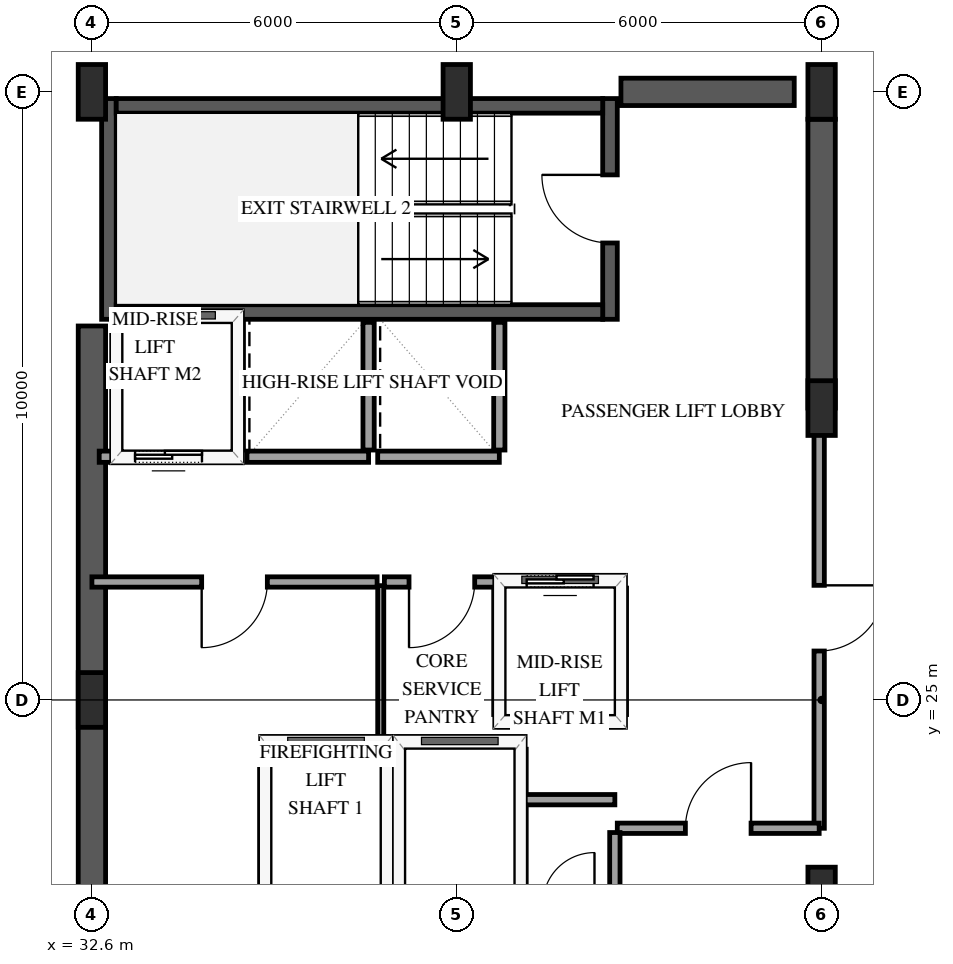
"""IFC4 building model, lengths in metres.
Left out: names, types, materials, properties, quantities, classifications, styles, units other than length and angle.
Written with IfcOpenShell. Run it as: python <this file> out.ifc"""

import sys

from ifc_helpers import new_model, si_unit, direction, frame, frame_2d, origin, origin_2d, place, context, subcontext, project, spatial, rectangle, extrude, element, fill, save


model = new_model("IFC4")
c1 = context("Model", 3, precision=1e-05, world=origin(), true_north=direction((0.0, 1.0)))
c2 = subcontext(c1, "Body", "Model", "MODEL_VIEW")
j1 = project(units=[si_unit("LENGTHUNIT", "METRE"), si_unit("PLANEANGLEUNIT", "RADIAN")], contexts=[c1])
p1 = place(None, origin())
s1 = spatial("IfcSite", under=j1, at=p1, CompositionType="ELEMENT")
p2 = place(p1, origin())
s2 = spatial("IfcBuilding", under=s1, at=p2, CompositionType="ELEMENT")
p3 = place(p2, frame((0.0, 0.0, 190.6)))
s3 = spatial("IfcBuildingStorey", under=s2, at=p3, CompositionType="ELEMENT", Elevation=190.6)
p4 = place(p3, frame((32.88, 31.26, 0.0), z_axis=(0.0, 0.0, 1.0), x_axis=(0.0, 1.0, 0.0)))
e1 = element("IfcWall", 1, at=p4, inside=s3, PredefinedType="SHEAR", context=c2, shape_type="SweptSolid", body=[
    extrude(rectangle(XDim=3.63, YDim=0.24, at=frame_2d((1.815, 0.0))), origin(), (0.0, 0.0, 1.0), 3.6),
])
p5 = place(p3, frame((41.12, 31.26, 0.0), z_axis=(0.0, 0.0, 1.0), x_axis=(0.0, 1.0, 0.0)))
e2 = element("IfcWall", 2, at=p5, inside=s3, PredefinedType="SHEAR", context=c2, shape_type="SweptSolid", body=[
    extrude(rectangle(XDim=3.63, YDim=0.24, at=frame_2d((1.815, 0.0))), origin(), (0.0, 0.0, 1.0), 3.6),
])
p6 = place(p5, frame((1.255, 0.0, 0.0)))
e3 = element("IfcOpeningElement", 3, at=p6, cuts=e2, PredefinedType="OPENING", context=c2, shape_type="SweptSolid", body=[
    extrude(rectangle(XDim=1.12, YDim=2.15, at=frame_2d((0.56, 1.075))), frame((0.0, 0.13, 0.0), z_axis=(0.0, -1.0, 0.0), x_axis=(1.0, 0.0, 0.0)), (0.0, 0.0, 1.0), 0.26),
])
for number, where, z_axis, x_axis in (
    (4, (33.0, 31.38, 0.0), (0.0, 0.0, 1.0), (1.0, 0.0, 0.0)),
    (5, (33.0, 34.77, 0.0), (0.0, 0.0, 1.0), (1.0, 0.0, 0.0)),
):
    element("IfcWall", number, at=place(p3, frame(where, z_axis=z_axis, x_axis=x_axis)), inside=s3, PredefinedType="SHEAR", context=c2, shape_type="SweptSolid", body=[
        extrude(rectangle(XDim=8.0, YDim=0.24, at=frame_2d((4.0, 0.0))), origin(), (0.0, 0.0, 1.0), 3.6),
    ])
p7 = place(p3, frame((32.6, 18.85, 0.0), z_axis=(0.0, 0.0, 1.0), x_axis=(0.0, 1.0, 0.0)))
e6 = element("IfcWall", 6, at=p7, inside=s3, PredefinedType="SHEAR", context=c2, shape_type="SweptSolid", body=[
    extrude(rectangle(XDim=12.3, YDim=0.45, at=frame_2d((6.15, 0.0))), origin(), (0.0, 0.0, 1.0), 3.6),
])
p8 = place(p3, frame((41.3, 35.0, 0.0), z_axis=(0.0, 0.0, 1.0), x_axis=(1.0, 0.0, 0.0)))
e7 = element("IfcWall", 7, at=p8, inside=s3, PredefinedType="SHEAR", context=c2, shape_type="SweptSolid", body=[
    extrude(rectangle(XDim=2.85, YDim=0.45, at=frame_2d((1.425, 0.0))), origin(), (0.0, 0.0, 1.0), 3.6),
])
p9 = place(p3, frame((44.6, 29.8, 0.0), z_axis=(0.0, 0.0, 1.0), x_axis=(0.0, 1.0, 0.0)))
e8 = element("IfcWall", 8, at=p9, inside=s3, PredefinedType="SHEAR", context=c2, shape_type="SweptSolid", body=[
    extrude(rectangle(XDim=4.75, YDim=0.45, at=frame_2d((2.375, 0.0))), origin(), (0.0, 0.0, 1.0), 3.6),
])
for number, where, z_axis, x_axis in (
    (9, (32.6, 25.0, -0.3), (0.0, 0.0, 1.0), (1.0, 0.0, 0.0)),
    (10, (32.6, 35.0, -0.3), (0.0, 0.0, 1.0), (1.0, 0.0, 0.0)),
    (11, (38.6, 35.0, -0.3), (0.0, 0.0, 1.0), (1.0, 0.0, 0.0)),
    (12, (44.6, 21.8, -0.3), (0.0, 0.0, 1.0), (1.0, 0.0, 0.0)),
    (13, (44.6, 29.8, -0.3), (0.0, 0.0, 1.0), (1.0, 0.0, 0.0)),
    (14, (44.6, 35.0, -0.3), (0.0, 0.0, 1.0), (1.0, 0.0, 0.0)),
):
    element("IfcColumn", number, at=place(p3, frame(where, z_axis=z_axis, x_axis=x_axis)), inside=s3, PredefinedType="PILASTER", context=c2, shape_type="SweptSolid", body=[
        extrude(rectangle(XDim=0.45, YDim=0.9, at=origin_2d()), origin(), (0.0, 0.0, 1.0), 3.9),
    ])
p10 = place(p3, frame((35.45, 24.3, 0.0), z_axis=(0.0, 0.0, 1.0), x_axis=(1.0, 0.0, 0.0)))
e15 = element("IfcWall", 15, at=p10, inside=s3, PredefinedType="SOLIDWALL", context=c2, shape_type="SweptSolid", body=[
    extrude(rectangle(XDim=2.0, YDim=0.185, at=frame_2d((1.0, 0.0))), origin(), (0.0, 0.0, 1.0), 3.3),
])
for number, where, z_axis, x_axis in (
    (16, (35.45, 21.81, 0.0), (0.0, 0.0, 1.0), (0.0, 1.0, 0.0)),
    (17, (37.45, 21.81, 0.0), (0.0, 0.0, 1.0), (0.0, 1.0, 0.0)),
):
    element("IfcWall", number, at=place(p3, frame(where, z_axis=z_axis, x_axis=x_axis)), inside=s3, PredefinedType="SOLIDWALL", context=c2, shape_type="SweptSolid", body=[
        extrude(rectangle(XDim=2.38, YDim=0.185, at=frame_2d((1.19, 0.0))), origin(), (0.0, 0.0, 1.0), 3.3),
    ])
p11 = place(p3, frame((37.65, 24.3, 0.0), z_axis=(0.0, 0.0, 1.0), x_axis=(1.0, 0.0, 0.0)))
e18 = element("IfcWall", 18, at=p11, inside=s3, PredefinedType="SOLIDWALL", context=c2, shape_type="SweptSolid", body=[
    extrude(rectangle(XDim=2.0, YDim=0.185, at=frame_2d((1.0, 0.0))), origin(), (0.0, 0.0, 1.0), 3.3),
])
p12 = place(p3, frame((39.65, 21.81, 0.0), z_axis=(0.0, 0.0, 1.0), x_axis=(0.0, 1.0, 0.0)))
e19 = element("IfcWall", 19, at=p12, inside=s3, PredefinedType="SOLIDWALL", context=c2, shape_type="SweptSolid", body=[
    extrude(rectangle(XDim=2.38, YDim=0.185, at=frame_2d((1.19, 0.0))), origin(), (0.0, 0.0, 1.0), 3.3),
])
p13 = place(p3, frame((39.3, 24.65, 0.0), z_axis=(0.0, 0.0, 1.0), x_axis=(1.0, 0.0, 0.0)))
e20 = element("IfcWall", 20, at=p13, inside=s3, PredefinedType="SOLIDWALL", context=c2, shape_type="SweptSolid", body=[
    extrude(rectangle(XDim=2.0, YDim=0.185, at=frame_2d((1.0, 0.0))), origin(), (0.0, 0.0, 1.0), 3.3),
])
p14 = place(p3, frame((39.3, 26.95, 0.0), z_axis=(0.0, 0.0, 1.0), x_axis=(1.0, 0.0, 0.0)))
e21 = element("IfcWall", 21, at=p14, inside=s3, PredefinedType="SOLIDWALL", context=c2, shape_type="SweptSolid", body=[
    extrude(rectangle(XDim=2.0, YDim=0.185, at=frame_2d((1.0, 0.0))), origin(), (0.0, 0.0, 1.0), 3.3),
])
p15 = place(p14, frame((0.45, 0.0, 0.0)))
e22 = element("IfcOpeningElement", 22, at=p15, cuts=e21, PredefinedType="OPENING", context=c2, shape_type="SweptSolid", body=[
    extrude(rectangle(XDim=1.1, YDim=2.15, at=frame_2d((0.55, 1.075))), frame((0.0, 0.103, 0.0), z_axis=(0.0, -1.0, 0.0), x_axis=(1.0, 0.0, 0.0)), (0.0, 0.0, 1.0), 0.205),
])
for number, where, z_axis, x_axis in (
    (23, (39.3, 24.76, 0.0), (0.0, 0.0, 1.0), (0.0, 1.0, 0.0)),
    (24, (41.3, 24.76, 0.0), (0.0, 0.0, 1.0), (0.0, 1.0, 0.0)),
):
    element("IfcWall", number, at=place(p3, frame(where, z_axis=z_axis, x_axis=x_axis)), inside=s3, PredefinedType="SOLIDWALL", context=c2, shape_type="SweptSolid", body=[
        extrude(rectangle(XDim=2.08, YDim=0.185, at=frame_2d((1.04, 0.0))), origin(), (0.0, 0.0, 1.0), 3.3),
    ])
p16 = place(p3, frame((32.72, 29.0, 0.0), z_axis=(0.0, 0.0, 1.0), x_axis=(1.0, 0.0, 0.0)))
e25 = element("IfcWall", 25, at=p16, inside=s3, PredefinedType="SOLIDWALL", context=c2, shape_type="SweptSolid", body=[
    extrude(rectangle(XDim=2.28, YDim=0.185, at=frame_2d((1.14, 0.0))), origin(), (0.0, 0.0, 1.0), 3.3),
])
p17 = place(p16, frame((0.59, 0.0, 0.0)))
e26 = element("IfcOpeningElement", 26, at=p17, cuts=e25, PredefinedType="OPENING", context=c2, shape_type="SweptSolid", body=[
    extrude(rectangle(XDim=1.1, YDim=2.15, at=frame_2d((0.55, 1.075))), frame((0.0, 0.103, 0.0), z_axis=(0.0, -1.0, 0.0), x_axis=(1.0, 0.0, 0.0)), (0.0, 0.0, 1.0), 0.205),
])
p18 = place(p3, frame((35.0, 29.11, 0.0), z_axis=(0.0, 0.0, 1.0), x_axis=(0.0, 1.0, 0.0)))
e27 = element("IfcWall", 27, at=p18, inside=s3, PredefinedType="SOLIDWALL", context=c2, shape_type="SweptSolid", body=[
    extrude(rectangle(XDim=2.1, YDim=0.185, at=frame_2d((1.05, 0.0))), origin(), (0.0, 0.0, 1.0), 3.3),
])
p19 = place(p3, frame((35.15, 29.0, 0.0), z_axis=(0.0, 0.0, 1.0), x_axis=(1.0, 0.0, 0.0)))
e28 = element("IfcWall", 28, at=p19, inside=s3, PredefinedType="SOLIDWALL", context=c2, shape_type="SweptSolid", body=[
    extrude(rectangle(XDim=2.0, YDim=0.185, at=frame_2d((1.0, 0.0))), origin(), (0.0, 0.0, 1.0), 3.3),
])
p20 = place(p3, frame((37.15, 29.11, 0.0), z_axis=(0.0, 0.0, 1.0), x_axis=(0.0, 1.0, 0.0)))
e29 = element("IfcWall", 29, at=p20, inside=s3, PredefinedType="SOLIDWALL", context=c2, shape_type="SweptSolid", body=[
    extrude(rectangle(XDim=2.1, YDim=0.185, at=frame_2d((1.05, 0.0))), origin(), (0.0, 0.0, 1.0), 3.3),
])
p21 = place(p3, frame((37.3, 29.0, 0.0), z_axis=(0.0, 0.0, 1.0), x_axis=(1.0, 0.0, 0.0)))
e30 = element("IfcWall", 30, at=p21, inside=s3, PredefinedType="SOLIDWALL", context=c2, shape_type="SweptSolid", body=[
    extrude(rectangle(XDim=2.0, YDim=0.185, at=frame_2d((1.0, 0.0))), origin(), (0.0, 0.0, 1.0), 3.3),
])
p22 = place(p3, frame((39.3, 29.11, 0.0), z_axis=(0.0, 0.0, 1.0), x_axis=(0.0, 1.0, 0.0)))
e31 = element("IfcWall", 31, at=p22, inside=s3, PredefinedType="SOLIDWALL", context=c2, shape_type="SweptSolid", body=[
    extrude(rectangle(XDim=2.1, YDim=0.185, at=frame_2d((1.05, 0.0))), origin(), (0.0, 0.0, 1.0), 3.3),
])
p23 = place(p3, frame((44.56, 29.8, 0.0), z_axis=(0.0, 0.0, 1.0), x_axis=(0.0, -1.0, 0.0)))
e32 = element("IfcWall", 32, at=p23, inside=s3, PredefinedType="PARTITIONING", context=c2, shape_type="SweptSolid", body=[
    extrude(rectangle(XDim=6.91, YDim=0.17, at=frame_2d((3.455, 0.0))), origin(), (0.0, 0.0, 1.0), 2.34),
])
p24 = place(p23, frame((2.915, 0.0, 0.0)))
e33 = element("IfcOpeningElement", 33, at=p24, cuts=e32, PredefinedType="OPENING", context=c2, shape_type="SweptSolid", body=[
    extrude(rectangle(XDim=1.08, YDim=2.15, at=frame_2d((0.54, 1.075))), frame((0.0, 0.095, 0.0), z_axis=(0.0, -1.0, 0.0), x_axis=(1.0, 0.0, 0.0)), (0.0, 0.0, 1.0), 0.19),
])
p25 = place(p3, frame((37.29, 26.94, 0.0), z_axis=(0.0, 0.0, 1.0), x_axis=(-1.0, 0.0, 0.0)))
e34 = element("IfcWall", 34, at=p25, inside=s3, PredefinedType="PARTITIONING", context=c2, shape_type="SweptSolid", body=[
    extrude(rectangle(XDim=4.69, YDim=0.17, at=frame_2d((2.345, 0.0))), origin(), (0.0, 0.0, 1.0), 3.3),
])
p26 = place(p25, frame((1.805, 0.0, 0.0)))
e35 = element("IfcOpeningElement", 35, at=p26, cuts=e34, PredefinedType="OPENING", context=c2, shape_type="SweptSolid", body=[
    extrude(rectangle(XDim=1.08, YDim=2.15, at=frame_2d((0.54, 1.075))), frame((0.0, 0.095, 0.0), z_axis=(0.0, -1.0, 0.0), x_axis=(1.0, 0.0, 0.0)), (0.0, 0.0, 1.0), 0.19),
])
p27 = place(p3, frame((41.24, 22.89, 0.0), z_axis=(0.0, 0.0, 1.0), x_axis=(1.0, 0.0, 0.0)))
e36 = element("IfcWall", 36, at=p27, inside=s3, PredefinedType="PARTITIONING", context=c2, shape_type="SweptSolid", body=[
    extrude(rectangle(XDim=3.32, YDim=0.17, at=frame_2d((1.66, 0.0))), origin(), (0.0, 0.0, 1.0), 3.3),
])
p28 = place(p27, frame((1.12, 0.0, 0.0)))
e37 = element("IfcOpeningElement", 37, at=p28, cuts=e36, PredefinedType="OPENING", context=c2, shape_type="SweptSolid", body=[
    extrude(rectangle(XDim=1.08, YDim=2.15, at=frame_2d((0.54, 1.075))), frame((0.0, 0.095, 0.0), z_axis=(0.0, -1.0, 0.0), x_axis=(1.0, 0.0, 0.0)), (0.0, 0.0, 1.0), 0.19),
])
p29 = place(p3, frame((37.35, 26.88, 0.0), z_axis=(0.0, 0.0, 1.0), x_axis=(0.0, -1.0, 0.0)))
e38 = element("IfcWall", 38, at=p29, inside=s3, PredefinedType="PARTITIONING", context=c2, shape_type="SweptSolid", body=[
    extrude(rectangle(XDim=2.58, YDim=0.1, at=frame_2d((1.29, 0.0))), origin(), (0.0, 0.0, 1.0), 3.3),
])
p30 = place(p3, frame((39.3, 26.94, 0.0), z_axis=(0.0, 0.0, 1.0), x_axis=(-1.0, 0.0, 0.0)))
e39 = element("IfcWall", 39, at=p30, inside=s3, PredefinedType="PARTITIONING", context=c2, shape_type="SweptSolid", body=[
    extrude(rectangle(XDim=1.89, YDim=0.17, at=frame_2d((0.945, 0.0))), origin(), (0.0, 0.0, 1.0), 3.3),
])
p31 = place(p30, frame((0.405, 0.0, 0.0)))
e40 = element("IfcOpeningElement", 40, at=p31, cuts=e39, PredefinedType="OPENING", context=c2, shape_type="SweptSolid", body=[
    extrude(rectangle(XDim=1.08, YDim=2.15, at=frame_2d((0.54, 1.075))), frame((0.0, 0.095, 0.0), z_axis=(0.0, -1.0, 0.0), x_axis=(1.0, 0.0, 0.0)), (0.0, 0.0, 1.0), 0.19),
])
p32 = place(p3, frame((41.2, 21.7, 0.0), z_axis=(0.0, 0.0, 1.0), x_axis=(0.0, 1.0, 0.0)))
e41 = element("IfcWall", 41, at=p32, inside=s3, PredefinedType="PARTITIONING", context=c2, shape_type="SweptSolid", body=[
    extrude(rectangle(XDim=1.12, YDim=0.17, at=frame_2d((0.56, 0.0))), origin(), (0.0, 0.0, 1.0), 3.3),
])
p33 = place(p3, frame((41.2, 23.36, 0.0), z_axis=(0.0, 0.0, 1.0), x_axis=(-1.0, 0.0, 0.0)))
e42 = element("IfcWall", 42, at=p33, inside=s3, PredefinedType="PARTITIONING", context=c2, shape_type="SweptSolid", body=[
    extrude(rectangle(XDim=1.48, YDim=0.17, at=frame_2d((0.74, 0.0))), origin(), (0.0, 0.0, 1.0), 3.3),
])
p34 = place(p15, origin())
e43 = element("IfcDoor", 43, at=p34, inside=s3, OperationType="SLIDING_TO_LEFT", PredefinedType="DOOR", context=c2, shape_type="SweptSolid", body=[
    extrude(rectangle(XDim=1.1, YDim=2.15, at=frame_2d((0.55, 1.075))), frame((0.0, 0.025, 0.0), z_axis=(0.0, -1.0, 0.0), x_axis=(1.0, 0.0, 0.0)), (0.0, 0.0, 1.0), 0.05),
])
fill(e22, e43)
p35 = place(p17, origin())
e44 = element("IfcDoor", 44, at=p35, inside=s3, OperationType="SLIDING_TO_LEFT", PredefinedType="DOOR", context=c2, shape_type="SweptSolid", body=[
    extrude(rectangle(XDim=1.1, YDim=2.15, at=frame_2d((0.55, 1.075))), frame((0.0, 0.025, 0.0), z_axis=(0.0, -1.0, 0.0), x_axis=(1.0, 0.0, 0.0)), (0.0, 0.0, 1.0), 0.05),
])
fill(e26, e44)
p36 = place(p6, origin())
e45 = element("IfcDoor", 45, at=p36, inside=s3, OperationType="SINGLE_SWING_RIGHT", PredefinedType="DOOR", context=c2, shape_type="SweptSolid", body=[
    extrude(rectangle(XDim=1.12, YDim=2.15, at=frame_2d((0.56, 1.075))), frame((0.0, 0.025, 0.0), z_axis=(0.0, -1.0, 0.0), x_axis=(1.0, 0.0, 0.0)), (0.0, 0.0, 1.0), 0.05),
])
fill(e3, e45)
p37 = place(p24, origin())
e46 = element("IfcDoor", 46, at=p37, inside=s3, OperationType="SINGLE_SWING_LEFT", PredefinedType="DOOR", context=c2, shape_type="SweptSolid", body=[
    extrude(rectangle(XDim=1.08, YDim=2.15, at=frame_2d((0.54, 1.075))), frame((0.0, 0.025, 0.0), z_axis=(0.0, -1.0, 0.0), x_axis=(1.0, 0.0, 0.0)), (0.0, 0.0, 1.0), 0.05),
])
fill(e33, e46)
p38 = place(p26, origin())
e47 = element("IfcDoor", 47, at=p38, inside=s3, OperationType="SINGLE_SWING_RIGHT", PredefinedType="DOOR", context=c2, shape_type="SweptSolid", body=[
    extrude(rectangle(XDim=1.08, YDim=2.15, at=frame_2d((0.54, 1.075))), frame((0.0, 0.025, 0.0), z_axis=(0.0, -1.0, 0.0), x_axis=(1.0, 0.0, 0.0)), (0.0, 0.0, 1.0), 0.05),
])
fill(e35, e47)
p39 = place(p28, origin())
e48 = element("IfcDoor", 48, at=p39, inside=s3, OperationType="SINGLE_SWING_RIGHT", PredefinedType="DOOR", context=c2, shape_type="SweptSolid", body=[
    extrude(rectangle(XDim=1.08, YDim=2.15, at=frame_2d((0.54, 1.075))), frame((0.0, 0.025, 0.0), z_axis=(0.0, -1.0, 0.0), x_axis=(1.0, 0.0, 0.0)), (0.0, 0.0, 1.0), 0.05),
])
fill(e37, e48)
p40 = place(p31, origin())
e49 = element("IfcDoor", 49, at=p40, inside=s3, OperationType="SINGLE_SWING_RIGHT", PredefinedType="DOOR", context=c2, shape_type="SweptSolid", body=[
    extrude(rectangle(XDim=1.08, YDim=2.15, at=frame_2d((0.54, 1.075))), frame((0.0, 0.025, 0.0), z_axis=(0.0, -1.0, 0.0), x_axis=(1.0, 0.0, 0.0)), (0.0, 0.0, 1.0), 0.05),
])
fill(e40, e49)
save(model, sys.argv[1])
